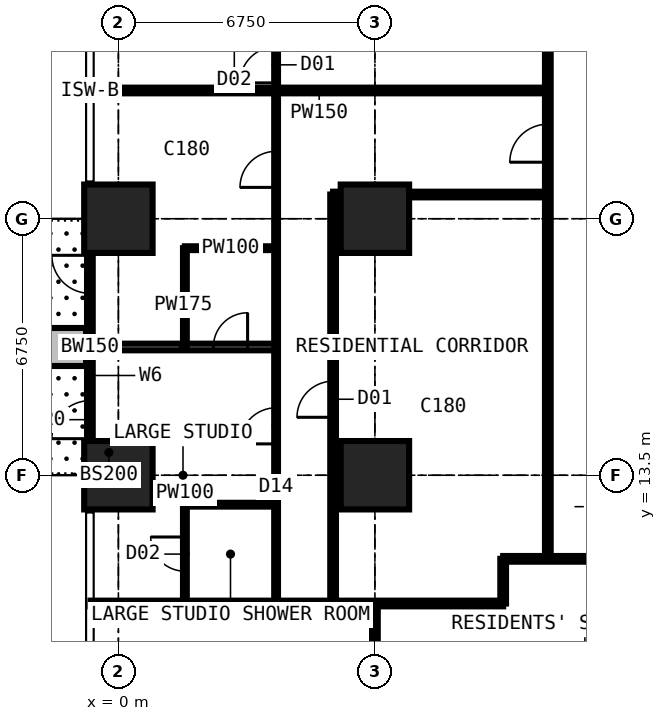
"""IFC4 building model, lengths in metres.
Left out: names, types, materials, properties, quantities, classifications, styles, units other than length and angle.
Written with IfcOpenShell. Run it as: python <this file> out.ifc"""

import sys

from ifc_helpers import new_model, si_unit, direction, frame, frame_2d, origin, origin_2d, place, context, subcontext, project, spatial, rectangle, extrude, element, fill, save


model = new_model("IFC4")
c1 = context("Model", 3, precision=1e-05, world=origin(), true_north=direction((0.0, 1.0)))
c2 = subcontext(c1, "Body", "Model", "MODEL_VIEW")
j1 = project(units=[si_unit("LENGTHUNIT", "METRE"), si_unit("PLANEANGLEUNIT", "RADIAN")], contexts=[c1])
p1 = place(None, origin())
s1 = spatial("IfcSite", under=j1, at=p1, CompositionType="ELEMENT")
p2 = place(p1, origin())
s2 = spatial("IfcBuilding", under=s1, at=p2, CompositionType="ELEMENT")
p3 = place(p2, frame((0.0, 0.0, 101.7)))
s3 = spatial("IfcBuildingStorey", under=s2, at=p3, CompositionType="ELEMENT", Elevation=101.7)
for number, where, z_axis, x_axis in (
    (1, (0.0, 13.5, 0.0), (0.0, 0.0, 1.0), (1.0, 0.0, 0.0)),
    (2, (0.0, 20.25, 0.0), (0.0, 0.0, 1.0), (1.0, 0.0, 0.0)),
    (3, (6.75, 13.5, 0.0), (0.0, 0.0, 1.0), (1.0, 0.0, 0.0)),
    (4, (6.75, 20.25, 0.0), (0.0, 0.0, 1.0), (1.0, 0.0, 0.0)),
):
    element("IfcColumn", number, at=place(p3, frame(where, z_axis=z_axis, x_axis=x_axis)), inside=s3, PredefinedType="COLUMN", context=c2, shape_type="SweptSolid", body=[
        extrude(rectangle(XDim=1.8, YDim=1.8, at=origin_2d()), origin(), (0.0, 0.0, 1.0), 3.6),
    ])
p4 = place(p3, frame((-0.75, 13.5, 0.0), z_axis=(0.0, 0.0, 1.0), x_axis=(0.0, 1.0, 0.0)))
e5 = element("IfcWall", 5, at=p4, inside=s3, PredefinedType="SOLIDWALL", context=c2, shape_type="SweptSolid", body=[
    extrude(rectangle(XDim=6.75, YDim=0.15, at=frame_2d((3.375, 0.0))), origin(), (0.0, 0.0, 1.0), 3.375),
])
p5 = place(p4, frame((0.962, 0.0, 0.0)))
e6 = element("IfcOpeningElement", 6, at=p5, cuts=e5, PredefinedType="OPENING", context=c2, shape_type="SweptSolid", body=[
    extrude(rectangle(XDim=1.0, YDim=2.2, at=frame_2d((0.5, 1.1))), frame((0.0, 0.085, 0.0), z_axis=(0.0, -1.0, 0.0), x_axis=(1.0, 0.0, 0.0)), (0.0, 0.0, 1.0), 0.17),
])
p6 = place(p4, frame((2.025, 0.0, 0.9)))
e7 = element("IfcOpeningElement", 7, at=p6, cuts=e5, PredefinedType="OPENING", context=c2, shape_type="SweptSolid", body=[
    extrude(rectangle(XDim=1.2, YDim=1.8, at=frame_2d((0.6, 0.9))), frame((0.0, 0.085, 0.0), z_axis=(0.0, -1.0, 0.0), x_axis=(1.0, 0.0, 0.0)), (0.0, 0.0, 1.0), 0.17),
])
p7 = place(p4, frame((4.788, 0.0, 0.0)))
e8 = element("IfcOpeningElement", 8, at=p7, cuts=e5, PredefinedType="OPENING", context=c2, shape_type="SweptSolid", body=[
    extrude(rectangle(XDim=1.0, YDim=2.2, at=frame_2d((0.5, 1.1))), frame((0.0, 0.085, 0.0), z_axis=(0.0, -1.0, 0.0), x_axis=(1.0, 0.0, 0.0)), (0.0, 0.0, 1.0), 0.17),
])
p8 = place(p4, frame((3.525, 0.0, 0.9)))
e9 = element("IfcOpeningElement", 9, at=p8, cuts=e5, PredefinedType="OPENING", context=c2, shape_type="SweptSolid", body=[
    extrude(rectangle(XDim=1.2, YDim=1.8, at=frame_2d((0.6, 0.9))), frame((0.0, 0.085, 0.0), z_axis=(0.0, -1.0, 0.0), x_axis=(1.0, 0.0, 0.0)), (0.0, 0.0, 1.0), 0.17),
])
p9 = place(p3, frame((-0.85, 16.875, 0.0), z_axis=(0.0, 0.0, 1.0), x_axis=(-1.0, 0.0, 0.0)))
e10 = element("IfcWall", 10, at=p9, inside=s3, PredefinedType="USERDEFINED", context=c2, shape_type="SweptSolid", body=[
    extrude(rectangle(XDim=2.2, YDim=1.0, at=frame_2d((1.1, 0.0))), origin(), (0.0, 0.0, 1.0), 0.9),
])
p10 = place(p3, frame((-0.734, 10.125, 0.0), z_axis=(0.0, 0.0, 1.0), x_axis=(1.0, 0.0, 0.0)))
e11 = element("IfcWall", 11, at=p10, inside=s3, PredefinedType="PARTITIONING", context=c2, shape_type="SweptSolid", body=[
    extrude(rectangle(XDim=10.859, YDim=0.15, at=frame_2d((5.429, 0.0))), origin(), (0.0, 0.0, 1.0), 3.375),
])
p11 = place(p3, frame((-0.734, 16.875, 0.0), z_axis=(0.0, 0.0, 1.0), x_axis=(1.0, 0.0, 0.0)))
e12 = element("IfcWall", 12, at=p11, inside=s3, PredefinedType="PARTITIONING", context=c2, shape_type="SweptSolid", body=[
    extrude(rectangle(XDim=4.884, YDim=0.175, at=frame_2d((2.442, 0.0))), origin(), (0.0, 0.0, 1.0), 3.375),
])
p12 = place(p11, frame((3.234, 0.0, 0.0)))
e13 = element("IfcOpeningElement", 13, at=p12, cuts=e12, PredefinedType="OPENING", context=c2, shape_type="SweptSolid", body=[
    extrude(rectangle(XDim=0.9, YDim=2.2, at=frame_2d((0.45, 1.1))), frame((0.0, 0.097, 0.0), z_axis=(0.0, -1.0, 0.0), x_axis=(1.0, 0.0, 0.0)), (0.0, 0.0, 1.0), 0.195),
])
p13 = place(p3, frame((-0.734, 23.625, 0.0), z_axis=(0.0, 0.0, 1.0), x_axis=(1.0, 0.0, 0.0)))
e14 = element("IfcWall", 14, at=p13, inside=s3, PredefinedType="PARTITIONING", context=c2, shape_type="SweptSolid", body=[
    extrude(rectangle(XDim=12.034, YDim=0.15, at=frame_2d((6.017, 0.0))), origin(), (0.0, 0.0, 1.0), 3.375),
])
p14 = place(p3, frame((1.75, 10.125, 0.0), z_axis=(0.0, 0.0, 1.0), x_axis=(0.0, 1.0, 0.0)))
e15 = element("IfcWall", 15, at=p14, inside=s3, PredefinedType="PARTITIONING", context=c2, shape_type="SweptSolid", body=[
    extrude(rectangle(XDim=2.6, YDim=0.1, at=frame_2d((1.3, 0.0))), origin(), (0.0, 0.0, 1.0), 3.375),
])
p15 = place(p14, frame((0.85, 0.0, 0.0)))
e16 = element("IfcOpeningElement", 16, at=p15, cuts=e15, PredefinedType="OPENING", context=c2, shape_type="SweptSolid", body=[
    extrude(rectangle(XDim=0.9, YDim=2.2, at=frame_2d((0.45, 1.1))), frame((0.0, 0.06, 0.0), z_axis=(0.0, -1.0, 0.0), x_axis=(1.0, 0.0, 0.0)), (0.0, 0.0, 1.0), 0.12),
])
p16 = place(p3, frame((1.75, 12.725, 0.0), z_axis=(0.0, 0.0, 1.0), x_axis=(1.0, 0.0, 0.0)))
e17 = element("IfcWall", 17, at=p16, inside=s3, PredefinedType="PARTITIONING", context=c2, shape_type="SweptSolid", body=[
    extrude(rectangle(XDim=2.4, YDim=0.1, at=frame_2d((1.2, 0.0))), origin(), (0.0, 0.0, 1.0), 3.375),
])
p17 = place(p3, frame((1.75, 16.875, 0.0), z_axis=(0.0, 0.0, 1.0), x_axis=(0.0, 1.0, 0.0)))
e18 = element("IfcWall", 18, at=p17, inside=s3, PredefinedType="PARTITIONING", context=c2, shape_type="SweptSolid", body=[
    extrude(rectangle(XDim=2.6, YDim=0.1, at=frame_2d((1.3, 0.0))), origin(), (0.0, 0.0, 1.0), 3.375),
])
p18 = place(p3, frame((1.75, 19.475, 0.0), z_axis=(0.0, 0.0, 1.0), x_axis=(1.0, 0.0, 0.0)))
e19 = element("IfcWall", 19, at=p18, inside=s3, PredefinedType="PARTITIONING", context=c2, shape_type="SweptSolid", body=[
    extrude(rectangle(XDim=2.4, YDim=0.1, at=frame_2d((1.2, 0.0))), origin(), (0.0, 0.0, 1.0), 3.375),
])
p19 = place(p3, frame((4.15, 10.125, 0.0), z_axis=(0.0, 0.0, 1.0), x_axis=(0.0, 1.0, 0.0)))
e20 = element("IfcWall", 20, at=p19, inside=s3, PredefinedType="PARTITIONING", context=c2, shape_type="SweptSolid", body=[
    extrude(rectangle(XDim=16.875, YDim=0.1, at=frame_2d((8.438, 0.0))), origin(), (0.0, 0.0, 1.0), 3.375),
])
p20 = place(p19, frame((13.7, 0.0, 0.0)))
e21 = element("IfcOpeningElement", 21, at=p20, cuts=e20, PredefinedType="OPENING", context=c2, shape_type="SweptSolid", body=[
    extrude(rectangle(XDim=0.95, YDim=2.2, at=frame_2d((0.475, 1.1))), frame((0.0, 0.06, 0.0), z_axis=(0.0, -1.0, 0.0), x_axis=(1.0, 0.0, 0.0)), (0.0, 0.0, 1.0), 0.12),
])
p21 = place(p19, frame((4.2, 0.0, 0.0)))
e22 = element("IfcOpeningElement", 22, at=p21, cuts=e20, PredefinedType="OPENING", context=c2, shape_type="SweptSolid", body=[
    extrude(rectangle(XDim=0.95, YDim=2.2, at=frame_2d((0.475, 1.1))), frame((0.0, 0.06, 0.0), z_axis=(0.0, -1.0, 0.0), x_axis=(1.0, 0.0, 0.0)), (0.0, 0.0, 1.0), 0.12),
])
p22 = place(p19, frame((10.95, 0.0, 0.0)))
e23 = element("IfcOpeningElement", 23, at=p22, cuts=e20, PredefinedType="OPENING", context=c2, shape_type="SweptSolid", body=[
    extrude(rectangle(XDim=0.95, YDim=2.2, at=frame_2d((0.475, 1.1))), frame((0.0, 0.06, 0.0), z_axis=(0.0, -1.0, 0.0), x_axis=(1.0, 0.0, 0.0)), (0.0, 0.0, 1.0), 0.12),
])
p23 = place(p3, frame((5.65, 10.125, 0.0), z_axis=(0.0, 0.0, 1.0), x_axis=(0.0, 1.0, 0.0)))
e24 = element("IfcWall", 24, at=p23, inside=s3, PredefinedType="PARTITIONING", context=c2, shape_type="SweptSolid", body=[
    extrude(rectangle(XDim=10.762, YDim=0.15, at=frame_2d((5.381, 0.0))), origin(), (0.0, 0.0, 1.0), 3.375),
])
p24 = place(p23, frame((4.9, 0.0, 0.0)))
e25 = element("IfcOpeningElement", 25, at=p24, cuts=e24, PredefinedType="OPENING", context=c2, shape_type="SweptSolid", body=[
    extrude(rectangle(XDim=0.95, YDim=2.2, at=frame_2d((0.475, 1.1))), frame((0.0, 0.085, 0.0), z_axis=(0.0, -1.0, 0.0), x_axis=(1.0, 0.0, 0.0)), (0.0, 0.0, 1.0), 0.17),
])
p25 = place(p3, frame((5.65, 20.887, 0.0), z_axis=(0.0, 0.0, 1.0), x_axis=(1.0, 0.0, 0.0)))
e26 = element("IfcWall", 26, at=p25, inside=s3, PredefinedType="PARTITIONING", context=c2, shape_type="SweptSolid", body=[
    extrude(rectangle(XDim=5.65, YDim=0.15, at=frame_2d((2.825, 0.0))), origin(), (0.0, 0.0, 1.0), 3.375),
])
p26 = place(p3, frame((6.75, 4.15, 0.0), z_axis=(0.0, 0.0, 1.0), x_axis=(0.0, 1.0, 0.0)))
e27 = element("IfcWall", 27, at=p26, inside=s3, PredefinedType="PARTITIONING", context=c2, shape_type="SweptSolid", body=[
    extrude(rectangle(XDim=5.975, YDim=0.15, at=frame_2d((2.988, 0.0))), origin(), (0.0, 0.0, 1.0), 2.877),
])
p27 = place(p3, frame((10.125, 10.125, 0.0), z_axis=(0.0, 0.0, 1.0), x_axis=(0.0, 1.0, 0.0)))
e28 = element("IfcWall", 28, at=p27, inside=s3, PredefinedType="PARTITIONING", context=c2, shape_type="SweptSolid", body=[
    extrude(rectangle(XDim=1.175, YDim=0.15, at=frame_2d((0.587, 0.0))), origin(), (0.0, 0.0, 1.0), 3.375),
])
p28 = place(p3, frame((10.125, 11.3, 0.0), z_axis=(0.0, 0.0, 1.0), x_axis=(1.0, 0.0, 0.0)))
e29 = element("IfcWall", 29, at=p28, inside=s3, PredefinedType="PARTITIONING", context=c2, shape_type="SweptSolid", body=[
    extrude(rectangle(XDim=20.675, YDim=0.15, at=frame_2d((10.337, 0.0))), origin(), (0.0, 0.0, 1.0), 3.375),
])
p29 = place(p28, frame((8.375, 0.0, 0.0)))
e30 = element("IfcOpeningElement", 30, at=p29, cuts=e29, PredefinedType="OPENING", context=c2, shape_type="SweptSolid", body=[
    extrude(rectangle(XDim=1.0, YDim=2.2, at=frame_2d((0.5, 1.1))), frame((0.0, 0.085, 0.0), z_axis=(0.0, -1.0, 0.0), x_axis=(1.0, 0.0, 0.0)), (0.0, 0.0, 1.0), 0.17),
])
p30 = place(p28, frame((10.975, 0.0, 0.0)))
e31 = element("IfcOpeningElement", 31, at=p30, cuts=e29, PredefinedType="OPENING", context=c2, shape_type="SweptSolid", body=[
    extrude(rectangle(XDim=1.0, YDim=2.2, at=frame_2d((0.5, 1.1))), frame((0.0, 0.085, 0.0), z_axis=(0.0, -1.0, 0.0), x_axis=(1.0, 0.0, 0.0)), (0.0, 0.0, 1.0), 0.17),
])
p31 = place(p28, frame((3.925, 0.0, 0.0)))
e32 = element("IfcOpeningElement", 32, at=p31, cuts=e29, PredefinedType="OPENING", context=c2, shape_type="SweptSolid", body=[
    extrude(rectangle(XDim=0.95, YDim=2.2, at=frame_2d((0.475, 1.1))), frame((0.0, 0.085, 0.0), z_axis=(0.0, -1.0, 0.0), x_axis=(1.0, 0.0, 0.0)), (0.0, 0.0, 1.0), 0.17),
])
p32 = place(p3, frame((11.3, 11.3, 0.0), z_axis=(0.0, 0.0, 1.0), x_axis=(0.0, 1.0, 0.0)))
e33 = element("IfcWall", 33, at=p32, inside=s3, PredefinedType="PARTITIONING", context=c2, shape_type="SweptSolid", body=[
    extrude(rectangle(XDim=19.3, YDim=0.15, at=frame_2d((9.65, 0.0))), origin(), (0.0, 0.0, 1.0), 3.375),
])
p33 = place(p32, frame((13.525, 0.0, 0.0)))
e34 = element("IfcOpeningElement", 34, at=p33, cuts=e33, PredefinedType="OPENING", context=c2, shape_type="SweptSolid", body=[
    extrude(rectangle(XDim=1.0, YDim=2.2, at=frame_2d((0.5, 1.1))), frame((0.0, 0.085, 0.0), z_axis=(0.0, -1.0, 0.0), x_axis=(1.0, 0.0, 0.0)), (0.0, 0.0, 1.0), 0.17),
])
p34 = place(p32, frame((10.438, 0.0, 0.0)))
e35 = element("IfcOpeningElement", 35, at=p34, cuts=e33, PredefinedType="OPENING", context=c2, shape_type="SweptSolid", body=[
    extrude(rectangle(XDim=1.0, YDim=2.2, at=frame_2d((0.5, 1.1))), frame((0.0, 0.085, 0.0), z_axis=(0.0, -1.0, 0.0), x_axis=(1.0, 0.0, 0.0)), (0.0, 0.0, 1.0), 0.17),
])
p35 = place(p5, origin())
e36 = element("IfcDoor", 36, at=p35, inside=s3, OperationType="SINGLE_SWING_LEFT", PredefinedType="DOOR", context=c2, shape_type="SweptSolid", body=[
    extrude(rectangle(XDim=1.0, YDim=2.2, at=frame_2d((0.5, 1.1))), frame((0.0, 0.025, 0.0), z_axis=(0.0, -1.0, 0.0), x_axis=(1.0, 0.0, 0.0)), (0.0, 0.0, 1.0), 0.05),
])
fill(e6, e36)
p36 = place(p6, origin())
e37 = element("IfcWindow", 37, at=p36, inside=s3, PartitioningType="SINGLE_PANEL", PredefinedType="WINDOW", context=c2, shape_type="SweptSolid", body=[
    extrude(rectangle(XDim=1.2, YDim=1.8, at=frame_2d((0.6, 0.9))), frame((0.0, 0.03, 0.0), z_axis=(0.0, -1.0, 0.0), x_axis=(1.0, 0.0, 0.0)), (0.0, 0.0, 1.0), 0.06),
])
fill(e7, e37)
p37 = place(p7, origin())
e38 = element("IfcDoor", 38, at=p37, inside=s3, OperationType="SINGLE_SWING_RIGHT", PredefinedType="DOOR", context=c2, shape_type="SweptSolid", body=[
    extrude(rectangle(XDim=1.0, YDim=2.2, at=frame_2d((0.5, 1.1))), frame((0.0, 0.025, 0.0), z_axis=(0.0, -1.0, 0.0), x_axis=(1.0, 0.0, 0.0)), (0.0, 0.0, 1.0), 0.05),
])
fill(e8, e38)
p38 = place(p8, origin())
e39 = element("IfcWindow", 39, at=p38, inside=s3, PartitioningType="SINGLE_PANEL", PredefinedType="WINDOW", context=c2, shape_type="SweptSolid", body=[
    extrude(rectangle(XDim=1.2, YDim=1.8, at=frame_2d((0.6, 0.9))), frame((0.0, 0.03, 0.0), z_axis=(0.0, -1.0, 0.0), x_axis=(1.0, 0.0, 0.0)), (0.0, 0.0, 1.0), 0.06),
])
fill(e9, e39)
p39 = place(p20, origin())
e40 = element("IfcDoor", 40, at=p39, inside=s3, OperationType="SINGLE_SWING_LEFT", PredefinedType="DOOR", context=c2, shape_type="SweptSolid", body=[
    extrude(rectangle(XDim=0.95, YDim=2.2, at=frame_2d((0.475, 1.1))), frame((0.0, 0.025, 0.0), z_axis=(0.0, -1.0, 0.0), x_axis=(1.0, 0.0, 0.0)), (0.0, 0.0, 1.0), 0.05),
])
fill(e21, e40)
p40 = place(p21, origin())
e41 = element("IfcDoor", 41, at=p40, inside=s3, OperationType="SINGLE_SWING_LEFT", PredefinedType="DOOR", context=c2, shape_type="SweptSolid", body=[
    extrude(rectangle(XDim=0.95, YDim=2.2, at=frame_2d((0.475, 1.1))), frame((0.0, 0.025, 0.0), z_axis=(0.0, -1.0, 0.0), x_axis=(1.0, 0.0, 0.0)), (0.0, 0.0, 1.0), 0.05),
])
fill(e22, e41)
p41 = place(p15, origin())
e42 = element("IfcDoor", 42, at=p41, inside=s3, OperationType="SINGLE_SWING_RIGHT", PredefinedType="DOOR", context=c2, shape_type="SweptSolid", body=[
    extrude(rectangle(XDim=0.9, YDim=2.2, at=frame_2d((0.45, 1.1))), frame((0.0, 0.025, 0.0), z_axis=(0.0, -1.0, 0.0), x_axis=(1.0, 0.0, 0.0)), (0.0, 0.0, 1.0), 0.05),
])
fill(e16, e42)
p42 = place(p22, origin())
e43 = element("IfcDoor", 43, at=p42, inside=s3, OperationType="SINGLE_SWING_LEFT", PredefinedType="DOOR", context=c2, shape_type="SweptSolid", body=[
    extrude(rectangle(XDim=0.95, YDim=2.2, at=frame_2d((0.475, 1.1))), frame((0.0, 0.025, 0.0), z_axis=(0.0, -1.0, 0.0), x_axis=(1.0, 0.0, 0.0)), (0.0, 0.0, 1.0), 0.05),
])
fill(e23, e43)
p43 = place(p12, origin())
e44 = element("IfcDoor", 44, at=p43, inside=s3, OperationType="SINGLE_SWING_RIGHT", PredefinedType="DOOR", context=c2, shape_type="SweptSolid", body=[
    extrude(rectangle(XDim=0.9, YDim=2.2, at=frame_2d((0.45, 1.1))), frame((0.0, 0.025, 0.0), z_axis=(0.0, -1.0, 0.0), x_axis=(1.0, 0.0, 0.0)), (0.0, 0.0, 1.0), 0.05),
])
fill(e13, e44)
p44 = place(p34, origin())
e45 = element("IfcDoor", 45, at=p44, inside=s3, OperationType="SINGLE_SWING_LEFT", PredefinedType="DOOR", context=c2, shape_type="SweptSolid", body=[
    extrude(rectangle(XDim=1.0, YDim=2.2, at=frame_2d((0.5, 1.1))), frame((0.0, 0.025, 0.0), z_axis=(0.0, -1.0, 0.0), x_axis=(1.0, 0.0, 0.0)), (0.0, 0.0, 1.0), 0.05),
])
fill(e35, e45)
p45 = place(p24, origin())
e46 = element("IfcDoor", 46, at=p45, inside=s3, OperationType="SINGLE_SWING_LEFT", PredefinedType="DOOR", context=c2, shape_type="SweptSolid", body=[
    extrude(rectangle(XDim=0.95, YDim=2.2, at=frame_2d((0.475, 1.1))), frame((0.0, 0.025, 0.0), z_axis=(0.0, -1.0, 0.0), x_axis=(1.0, 0.0, 0.0)), (0.0, 0.0, 1.0), 0.05),
])
fill(e25, e46)
save(model, sys.argv[1])
